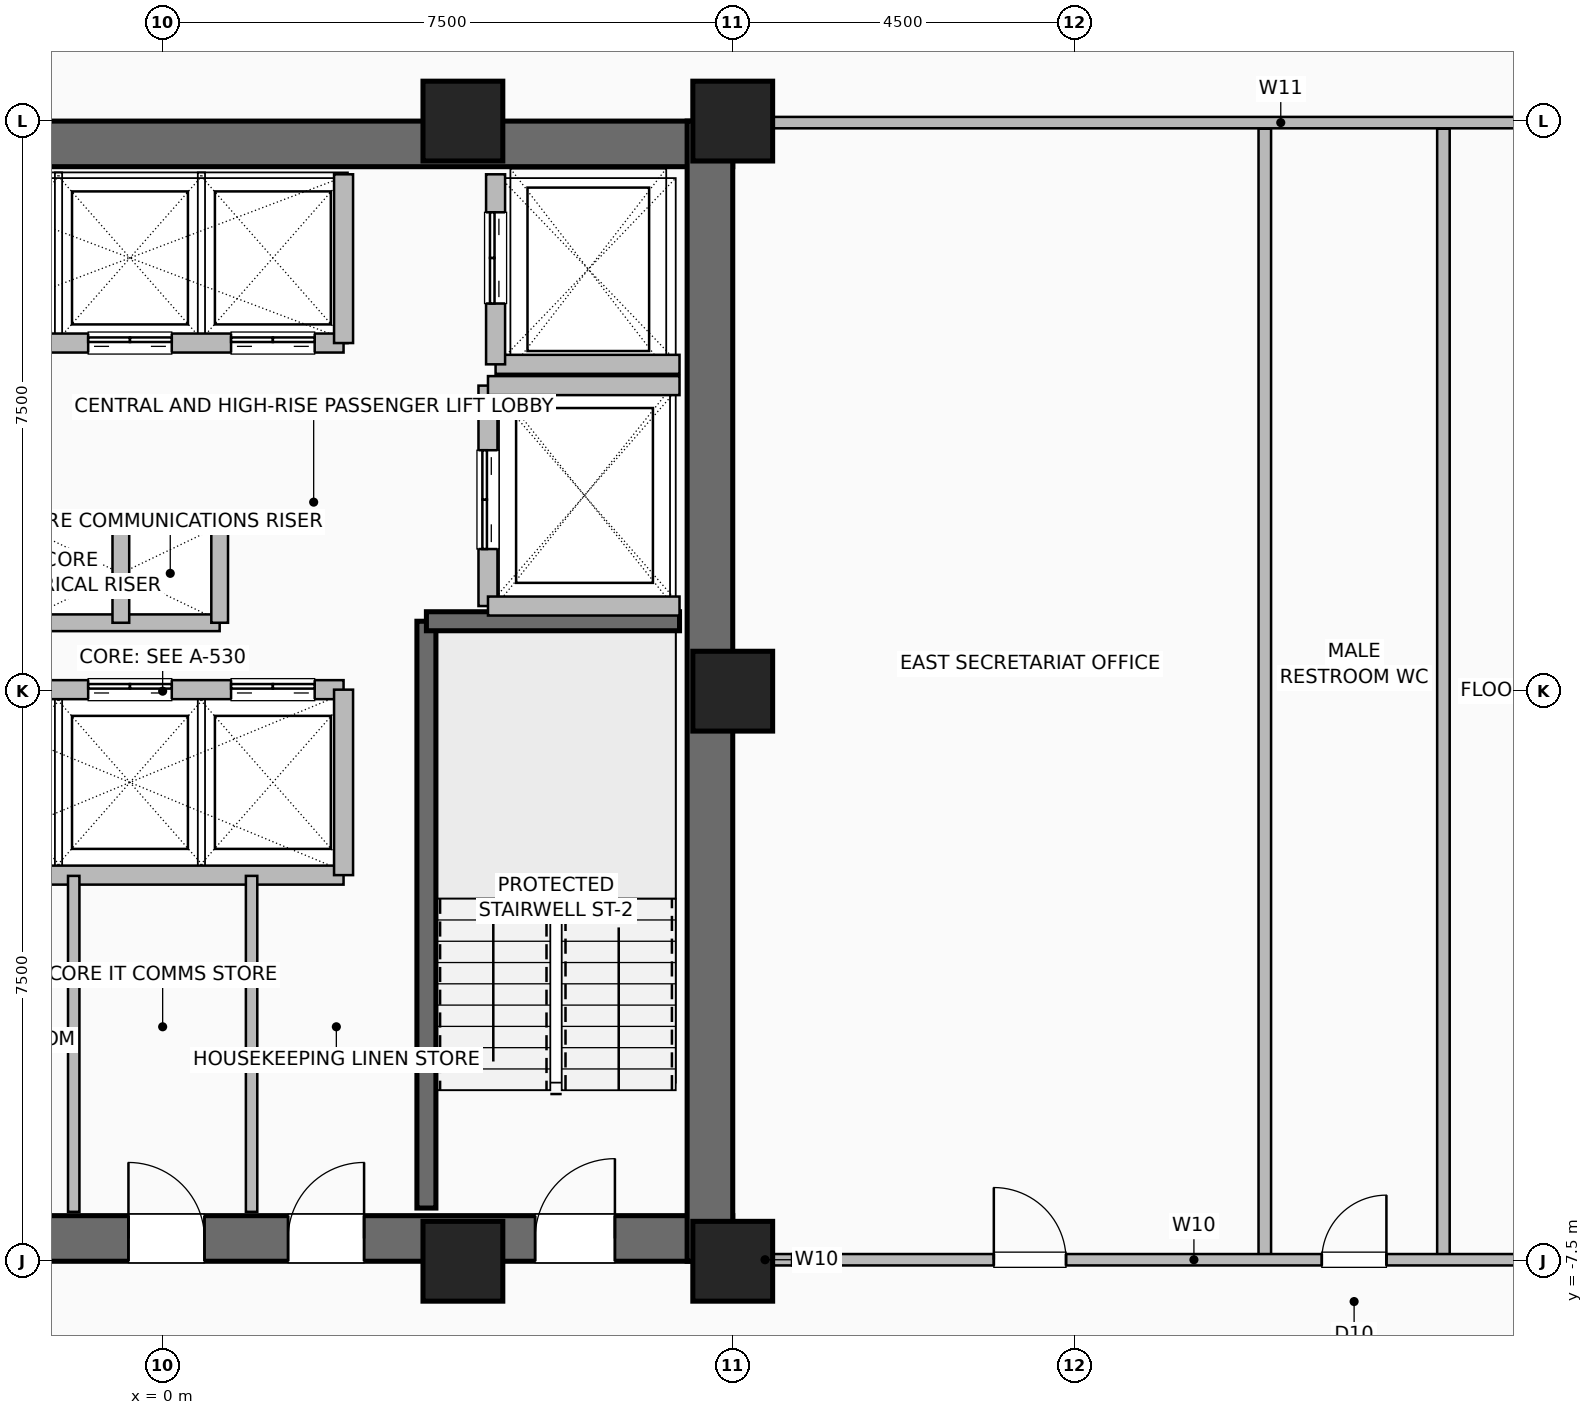
"""IFC4 building model, lengths in metres.
Left out: names, types, materials, properties, quantities, classifications, styles, units other than length and angle.
Written with IfcOpenShell. Run it as: python <this file> out.ifc"""

import sys

from ifc_helpers import new_model, si_unit, direction, frame, frame_2d, origin, origin_2d, place, context, subcontext, project, spatial, rectangle, hollow_rectangle, extrude, element, fill, save


model = new_model("IFC4")
c1 = context("Model", 3, precision=1e-05, world=origin(), true_north=direction((0.0, 1.0)))
c2 = subcontext(c1, "Body", "Model", "MODEL_VIEW")
j1 = project(units=[si_unit("LENGTHUNIT", "METRE"), si_unit("PLANEANGLEUNIT", "RADIAN")], contexts=[c1])
p1 = place(None, origin())
s1 = spatial("IfcSite", under=j1, at=p1, CompositionType="ELEMENT")
p2 = place(p1, origin())
s2 = spatial("IfcBuilding", under=s1, at=p2, CompositionType="ELEMENT")
p3 = place(p2, frame((0.0, 0.0, 115.6)))
s3 = spatial("IfcBuildingStorey", under=s2, at=p3, CompositionType="ELEMENT", Elevation=115.6)
for number, where, z_axis, x_axis in (
    (1, (3.95, -7.5, 0.0), (0.0, 0.0, 1.0), (1.0, 0.0, 0.0)),
    (2, (7.5, -7.5, 0.0), (0.0, 0.0, 1.0), (1.0, 0.0, 0.0)),
    (3, (7.5, 0.0, 0.0), (0.0, 0.0, 1.0), (1.0, 0.0, 0.0)),
    (4, (7.5, 7.5, 0.0), (0.0, 0.0, 1.0), (1.0, 0.0, 0.0)),
    (5, (3.95, 7.5, 0.0), (0.0, 0.0, 1.0), (1.0, 0.0, 0.0)),
):
    element("IfcColumn", number, at=place(p3, frame(where, z_axis=z_axis, x_axis=x_axis)), inside=s3, PredefinedType="COLUMN", context=c2, shape_type="SweptSolid", body=[
        extrude(hollow_rectangle(XDim=1.05, YDim=1.05, WallThickness=0.05, at=origin_2d()), origin(), (0.0, 0.0, 1.0), 3.6),
    ])
p4 = place(p3, frame((-7.5, -7.2, 0.0), z_axis=(0.0, 0.0, 1.0), x_axis=(1.0, 0.0, 0.0)))
e6 = element("IfcWall", 6, at=p4, inside=s3, PredefinedType="SHEAR", context=c2, shape_type="SweptSolid", body=[
    extrude(rectangle(XDim=15.0, YDim=0.6, at=frame_2d((7.5, 0.0))), origin(), (0.0, 0.0, 1.0), 3.36),
])
p5 = place(p4, frame((1.55, 0.0, 0.0)))
e7 = element("IfcOpeningElement", 7, at=p5, cuts=e6, PredefinedType="OPENING", context=c2, shape_type="SweptSolid", body=[
    extrude(rectangle(XDim=1.05, YDim=2.08, at=frame_2d((0.525, 1.04))), frame((0.0, 0.31, 0.0), z_axis=(0.0, -1.0, 0.0), x_axis=(1.0, 0.0, 0.0)), (0.0, 0.0, 1.0), 0.62),
])
p6 = place(p4, frame((12.4, 0.0, 0.0)))
e8 = element("IfcOpeningElement", 8, at=p6, cuts=e6, PredefinedType="OPENING", context=c2, shape_type="SweptSolid", body=[
    extrude(rectangle(XDim=1.05, YDim=2.08, at=frame_2d((0.525, 1.04))), frame((0.0, 0.31, 0.0), z_axis=(0.0, -1.0, 0.0), x_axis=(1.0, 0.0, 0.0)), (0.0, 0.0, 1.0), 0.62),
])
p7 = place(p4, frame((4.95, 0.0, 0.0)))
e9 = element("IfcOpeningElement", 9, at=p7, cuts=e6, PredefinedType="OPENING", context=c2, shape_type="SweptSolid", body=[
    extrude(rectangle(XDim=1.0, YDim=2.08, at=frame_2d((0.5, 1.04))), frame((0.0, 0.31, 0.0), z_axis=(0.0, -1.0, 0.0), x_axis=(1.0, 0.0, 0.0)), (0.0, 0.0, 1.0), 0.62),
])
p8 = place(p4, frame((7.05, 0.0, 0.0)))
e10 = element("IfcOpeningElement", 10, at=p8, cuts=e6, PredefinedType="OPENING", context=c2, shape_type="SweptSolid", body=[
    extrude(rectangle(XDim=1.0, YDim=2.08, at=frame_2d((0.5, 1.04))), frame((0.0, 0.31, 0.0), z_axis=(0.0, -1.0, 0.0), x_axis=(1.0, 0.0, 0.0)), (0.0, 0.0, 1.0), 0.62),
])
p9 = place(p4, frame((9.15, 0.0, 0.0)))
e11 = element("IfcOpeningElement", 11, at=p9, cuts=e6, PredefinedType="OPENING", context=c2, shape_type="SweptSolid", body=[
    extrude(rectangle(XDim=1.0, YDim=2.08, at=frame_2d((0.5, 1.04))), frame((0.0, 0.31, 0.0), z_axis=(0.0, -1.0, 0.0), x_axis=(1.0, 0.0, 0.0)), (0.0, 0.0, 1.0), 0.62),
])
for number, where, z_axis, x_axis in (
    (12, (-7.5, 7.2, 0.0), (0.0, 0.0, 1.0), (1.0, 0.0, 0.0)),
    (13, (7.2, -7.5, 0.0), (0.0, 0.0, 1.0), (0.0, 1.0, 0.0)),
):
    element("IfcWall", number, at=place(p3, frame(where, z_axis=z_axis, x_axis=x_axis)), inside=s3, PredefinedType="SHEAR", context=c2, shape_type="SweptSolid", body=[
        extrude(rectangle(XDim=15.0, YDim=0.6, at=frame_2d((7.5, 0.0))), origin(), (0.0, 0.0, 1.0), 3.36),
    ])
p10 = place(p3, frame((3.47, -6.8, 0.0), z_axis=(0.0, 0.0, 1.0), x_axis=(0.0, 1.0, 0.0)))
e14 = element("IfcWall", 14, at=p10, inside=s3, PredefinedType="SHEAR", context=c2, shape_type="SweptSolid", body=[
    extrude(rectangle(XDim=7.72, YDim=0.25, at=frame_2d((3.86, 0.0))), origin(), (0.0, 0.0, 1.0), 3.36),
])
p11 = place(p3, frame((3.47, 0.92, 0.0), z_axis=(0.0, 0.0, 1.0), x_axis=(1.0, 0.0, 0.0)))
e15 = element("IfcWall", 15, at=p11, inside=s3, PredefinedType="SHEAR", context=c2, shape_type="SweptSolid", body=[
    extrude(rectangle(XDim=3.33, YDim=0.25, at=frame_2d((1.665, 0.0))), origin(), (0.0, 0.0, 1.0), 3.36),
])
for number, where, z_axis, x_axis in (
    (16, (-1.85, 2.2, 0.0), (0.0, 0.0, 1.0), (1.0, 0.0, 0.0)),
    (17, (-1.85, 0.9, 0.0), (0.0, 0.0, 1.0), (1.0, 0.0, 0.0)),
):
    element("IfcWall", number, at=place(p3, frame(where, z_axis=z_axis, x_axis=x_axis)), inside=s3, PredefinedType="PARTITIONING", context=c2, shape_type="SweptSolid", body=[
        extrude(rectangle(XDim=2.6, YDim=0.22, at=frame_2d((1.3, 0.0))), origin(), (0.0, 0.0, 1.0), 3.36),
    ])
for number, where, z_axis, x_axis in (
    (18, (-0.55, 0.9, 0.0), (0.0, 0.0, 1.0), (0.0, 1.0, 0.0)),
    (19, (0.75, 0.9, 0.0), (0.0, 0.0, 1.0), (0.0, 1.0, 0.0)),
):
    element("IfcWall", number, at=place(p3, frame(where, z_axis=z_axis, x_axis=x_axis)), inside=s3, PredefinedType="PARTITIONING", context=c2, shape_type="SweptSolid", body=[
        extrude(rectangle(XDim=1.3, YDim=0.22, at=frame_2d((0.65, 0.0))), origin(), (0.0, 0.0, 1.0), 3.36),
    ])
p12 = place(p3, frame((-3.26, 0.02, 0.0), z_axis=(0.0, 0.0, 1.0), x_axis=(1.0, 0.0, 0.0)))
e20 = element("IfcWall", 20, at=p12, inside=s3, PredefinedType="SHEAR", context=c2, shape_type="SweptSolid", body=[
    extrude(rectangle(XDim=5.64, YDim=0.25, at=frame_2d((2.82, 0.0))), origin(), (0.0, 0.0, 1.0), 3.36),
])
p13 = place(p12, frame((0.4, 0.0, 0.0)))
e21 = element("IfcOpeningElement", 21, at=p13, cuts=e20, PredefinedType="OPENING", context=c2, shape_type="SweptSolid", body=[
    extrude(rectangle(XDim=1.1, YDim=2.2, at=frame_2d((0.55, 1.1))), frame((0.0, 0.135, 0.0), z_axis=(0.0, -1.0, 0.0), x_axis=(1.0, 0.0, 0.0)), (0.0, 0.0, 1.0), 0.27),
])
p14 = place(p12, frame((2.28, 0.0, 0.0)))
e22 = element("IfcOpeningElement", 22, at=p14, cuts=e20, PredefinedType="OPENING", context=c2, shape_type="SweptSolid", body=[
    extrude(rectangle(XDim=1.1, YDim=2.2, at=frame_2d((0.55, 1.1))), frame((0.0, 0.135, 0.0), z_axis=(0.0, -1.0, 0.0), x_axis=(1.0, 0.0, 0.0)), (0.0, 0.0, 1.0), 0.27),
])
p15 = place(p12, frame((4.16, 0.0, 0.0)))
e23 = element("IfcOpeningElement", 23, at=p15, cuts=e20, PredefinedType="OPENING", context=c2, shape_type="SweptSolid", body=[
    extrude(rectangle(XDim=1.1, YDim=2.2, at=frame_2d((0.55, 1.1))), frame((0.0, 0.135, 0.0), z_axis=(0.0, -1.0, 0.0), x_axis=(1.0, 0.0, 0.0)), (0.0, 0.0, 1.0), 0.27),
])
p16 = place(p3, frame((-3.26, -2.42, 0.0), z_axis=(0.0, 0.0, 1.0), x_axis=(1.0, 0.0, 0.0)))
e24 = element("IfcWall", 24, at=p16, inside=s3, PredefinedType="SHEAR", context=c2, shape_type="SweptSolid", body=[
    extrude(rectangle(XDim=5.64, YDim=0.25, at=frame_2d((2.82, 0.0))), origin(), (0.0, 0.0, 1.0), 3.36),
])
p17 = place(p3, frame((2.38, -2.42, 0.0), z_axis=(0.0, 0.0, 1.0), x_axis=(0.0, 1.0, 0.0)))
e25 = element("IfcWall", 25, at=p17, inside=s3, PredefinedType="SHEAR", context=c2, shape_type="SweptSolid", body=[
    extrude(rectangle(XDim=2.44, YDim=0.25, at=frame_2d((1.22, 0.0))), origin(), (0.0, 0.0, 1.0), 3.36),
])
p18 = place(p3, frame((-3.26, 4.58, 0.0), z_axis=(0.0, 0.0, 1.0), x_axis=(1.0, 0.0, 0.0)))
e26 = element("IfcWall", 26, at=p18, inside=s3, PredefinedType="SHEAR", context=c2, shape_type="SweptSolid", body=[
    extrude(rectangle(XDim=5.64, YDim=0.25, at=frame_2d((2.82, 0.0))), origin(), (0.0, 0.0, 1.0), 3.36),
])
p19 = place(p18, frame((0.4, 0.0, 0.0)))
e27 = element("IfcOpeningElement", 27, at=p19, cuts=e26, PredefinedType="OPENING", context=c2, shape_type="SweptSolid", body=[
    extrude(rectangle(XDim=1.1, YDim=2.2, at=frame_2d((0.55, 1.1))), frame((0.0, 0.135, 0.0), z_axis=(0.0, -1.0, 0.0), x_axis=(1.0, 0.0, 0.0)), (0.0, 0.0, 1.0), 0.27),
])
p20 = place(p18, frame((2.28, 0.0, 0.0)))
e28 = element("IfcOpeningElement", 28, at=p20, cuts=e26, PredefinedType="OPENING", context=c2, shape_type="SweptSolid", body=[
    extrude(rectangle(XDim=1.1, YDim=2.2, at=frame_2d((0.55, 1.1))), frame((0.0, 0.135, 0.0), z_axis=(0.0, -1.0, 0.0), x_axis=(1.0, 0.0, 0.0)), (0.0, 0.0, 1.0), 0.27),
])
p21 = place(p18, frame((4.16, 0.0, 0.0)))
e29 = element("IfcOpeningElement", 29, at=p21, cuts=e26, PredefinedType="OPENING", context=c2, shape_type="SweptSolid", body=[
    extrude(rectangle(XDim=1.1, YDim=2.2, at=frame_2d((0.55, 1.1))), frame((0.0, 0.135, 0.0), z_axis=(0.0, -1.0, 0.0), x_axis=(1.0, 0.0, 0.0)), (0.0, 0.0, 1.0), 0.27),
])
p22 = place(p3, frame((2.38, 4.58, 0.0), z_axis=(0.0, 0.0, 1.0), x_axis=(0.0, 1.0, 0.0)))
e30 = element("IfcWall", 30, at=p22, inside=s3, PredefinedType="SHEAR", context=c2, shape_type="SweptSolid", body=[
    extrude(rectangle(XDim=2.22, YDim=0.25, at=frame_2d((1.11, 0.0))), origin(), (0.0, 0.0, 1.0), 3.36),
])
p23 = place(p3, frame((4.38, 4.3, 0.0), z_axis=(0.0, 0.0, 1.0), x_axis=(1.0, 0.0, 0.0)))
e31 = element("IfcWall", 31, at=p23, inside=s3, PredefinedType="SHEAR", context=c2, shape_type="SweptSolid", body=[
    extrude(rectangle(XDim=2.42, YDim=0.25, at=frame_2d((1.21, 0.0))), origin(), (0.0, 0.0, 1.0), 3.36),
])
p24 = place(p3, frame((4.38, 4.3, 0.0), z_axis=(0.0, 0.0, 1.0), x_axis=(0.0, 1.0, 0.0)))
e32 = element("IfcWall", 32, at=p24, inside=s3, PredefinedType="SHEAR", context=c2, shape_type="SweptSolid", body=[
    extrude(rectangle(XDim=2.5, YDim=0.25, at=frame_2d((1.25, 0.0))), origin(), (0.0, 0.0, 1.0), 3.36),
])
p25 = place(p24, frame((0.8, 0.0, 0.0)))
e33 = element("IfcOpeningElement", 33, at=p25, cuts=e32, PredefinedType="OPENING", context=c2, shape_type="SweptSolid", body=[
    extrude(rectangle(XDim=1.2, YDim=2.2, at=frame_2d((0.6, 1.1))), frame((0.0, 0.135, 0.0), z_axis=(0.0, -1.0, 0.0), x_axis=(1.0, 0.0, 0.0)), (0.0, 0.0, 1.0), 0.27),
])
p26 = place(p3, frame((4.28, 1.12, 0.0), z_axis=(0.0, 0.0, 1.0), x_axis=(0.0, 1.0, 0.0)))
e34 = element("IfcWall", 34, at=p26, inside=s3, PredefinedType="SHEAR", context=c2, shape_type="SweptSolid", body=[
    extrude(rectangle(XDim=2.9, YDim=0.25, at=frame_2d((1.45, 0.0))), origin(), (0.0, 0.0, 1.0), 3.36),
])
p27 = place(p26, frame((0.75, 0.0, 0.0)))
e35 = element("IfcOpeningElement", 35, at=p27, cuts=e34, PredefinedType="OPENING", context=c2, shape_type="SweptSolid", body=[
    extrude(rectangle(XDim=1.3, YDim=2.3, at=frame_2d((0.65, 1.15))), frame((0.0, 0.135, 0.0), z_axis=(0.0, -1.0, 0.0), x_axis=(1.0, 0.0, 0.0)), (0.0, 0.0, 1.0), 0.27),
])
for number, where, z_axis, x_axis in (
    (36, (4.28, 1.12, 0.0), (0.0, 0.0, 1.0), (1.0, 0.0, 0.0)),
    (37, (4.28, 4.02, 0.0), (0.0, 0.0, 1.0), (1.0, 0.0, 0.0)),
):
    element("IfcWall", number, at=place(p3, frame(where, z_axis=z_axis, x_axis=x_axis)), inside=s3, PredefinedType="SHEAR", context=c2, shape_type="SweptSolid", body=[
        extrude(rectangle(XDim=2.52, YDim=0.25, at=frame_2d((1.26, 0.0))), origin(), (0.0, 0.0, 1.0), 3.36),
    ])
for number, where, z_axis, x_axis in (
    (38, (-1.17, -6.85, 0.0), (0.0, 0.0, 1.0), (0.0, 1.0, 0.0)),
    (39, (1.17, -6.85, 0.0), (0.0, 0.0, 1.0), (0.0, 1.0, 0.0)),
):
    element("IfcWall", number, at=place(p3, frame(where, z_axis=z_axis, x_axis=x_axis)), inside=s3, PredefinedType="PARTITIONING", context=c2, shape_type="SweptSolid", body=[
        extrude(rectangle(XDim=4.42, YDim=0.15, at=frame_2d((2.21, 0.0))), origin(), (0.0, 0.0, 1.0), 3.36),
    ])
p28 = place(p3, frame((7.45, -7.48, 0.0), z_axis=(0.0, 0.0, 1.0), x_axis=(1.0, 0.0, 0.0)))
e40 = element("IfcWall", 40, at=p28, inside=s3, PredefinedType="PARTITIONING", context=c2, shape_type="SweptSolid", body=[
    extrude(rectangle(XDim=0.95, YDim=0.15, at=frame_2d((0.475, 0.0))), origin(), (0.0, 0.0, 1.0), 3.36),
])
for number, where, z_axis, x_axis in (
    (41, (16.85, -7.48, 0.0), (0.0, 0.0, 1.0), (0.0, 1.0, 0.0)),
    (42, (14.5, -7.48, 0.0), (0.0, 0.0, 1.0), (0.0, 1.0, 0.0)),
):
    element("IfcWall", number, at=place(p3, frame(where, z_axis=z_axis, x_axis=x_axis)), inside=s3, PredefinedType="PLUMBINGWALL", context=c2, shape_type="SweptSolid", body=[
        extrude(rectangle(XDim=14.88, YDim=0.165, at=frame_2d((7.44, 0.0))), origin(), (0.0, 0.0, 1.0), 3.36),
    ])
p29 = place(p3, frame((8.28, -7.48, 0.0), z_axis=(0.0, 0.0, 1.0), x_axis=(1.0, 0.0, 0.0)))
e43 = element("IfcWall", 43, at=p29, inside=s3, PredefinedType="PARTITIONING", context=c2, shape_type="SweptSolid", body=[
    extrude(rectangle(XDim=13.54, YDim=0.15, at=frame_2d((6.77, 0.0))), origin(), (0.0, 0.0, 1.0), 3.36),
])
p30 = place(p29, frame((2.655, 0.0, 0.0)))
e44 = element("IfcOpeningElement", 44, at=p30, cuts=e43, PredefinedType="OPENING", context=c2, shape_type="SweptSolid", body=[
    extrude(rectangle(XDim=0.95, YDim=2.06, at=frame_2d((0.475, 1.03))), frame((0.0, 0.085, 0.0), z_axis=(0.0, -1.0, 0.0), x_axis=(1.0, 0.0, 0.0)), (0.0, 0.0, 1.0), 0.17),
])
p31 = place(p29, frame((6.97, 0.0, 0.0)))
e45 = element("IfcOpeningElement", 45, at=p31, cuts=e43, PredefinedType="OPENING", context=c2, shape_type="SweptSolid", body=[
    extrude(rectangle(XDim=0.85, YDim=2.05, at=frame_2d((0.425, 1.025))), frame((0.0, 0.085, 0.0), z_axis=(0.0, -1.0, 0.0), x_axis=(1.0, 0.0, 0.0)), (0.0, 0.0, 1.0), 0.17),
])
p32 = place(p29, frame((10.52, 0.0, 0.0)))
e46 = element("IfcOpeningElement", 46, at=p32, cuts=e43, PredefinedType="OPENING", context=c2, shape_type="SweptSolid", body=[
    extrude(rectangle(XDim=0.95, YDim=2.06, at=frame_2d((0.475, 1.03))), frame((0.0, 0.085, 0.0), z_axis=(0.0, -1.0, 0.0), x_axis=(1.0, 0.0, 0.0)), (0.0, 0.0, 1.0), 0.17),
])
p33 = place(p3, frame((7.6, 7.48, 0.0), z_axis=(0.0, 0.0, 1.0), x_axis=(1.0, 0.0, 0.0)))
e47 = element("IfcWall", 47, at=p33, inside=s3, PredefinedType="PARTITIONING", context=c2, shape_type="SweptSolid", body=[
    extrude(rectangle(XDim=14.22, YDim=0.15, at=frame_2d((7.11, 0.0))), origin(), (0.0, 0.0, 1.0), 3.36),
])
p34 = place(p6, origin())
e48 = element("IfcDoor", 48, at=p34, inside=s3, OperationType="SINGLE_SWING_RIGHT", PredefinedType="DOOR", context=c2, shape_type="SweptSolid", body=[
    extrude(rectangle(XDim=1.05, YDim=2.08, at=frame_2d((0.525, 1.04))), frame((0.0, 0.025, 0.0), z_axis=(0.0, -1.0, 0.0), x_axis=(1.0, 0.0, 0.0)), (0.0, 0.0, 1.0), 0.05),
])
fill(e8, e48)
p35 = place(p8, origin())
e49 = element("IfcDoor", 49, at=p35, inside=s3, OperationType="SINGLE_SWING_LEFT", PredefinedType="DOOR", context=c2, shape_type="SweptSolid", body=[
    extrude(rectangle(XDim=1.0, YDim=2.08, at=frame_2d((0.5, 1.04))), frame((0.0, 0.025, 0.0), z_axis=(0.0, -1.0, 0.0), x_axis=(1.0, 0.0, 0.0)), (0.0, 0.0, 1.0), 0.05),
])
fill(e10, e49)
p36 = place(p9, origin())
e50 = element("IfcDoor", 50, at=p36, inside=s3, OperationType="SINGLE_SWING_RIGHT", PredefinedType="DOOR", context=c2, shape_type="SweptSolid", body=[
    extrude(rectangle(XDim=1.0, YDim=2.08, at=frame_2d((0.5, 1.04))), frame((0.0, 0.025, 0.0), z_axis=(0.0, -1.0, 0.0), x_axis=(1.0, 0.0, 0.0)), (0.0, 0.0, 1.0), 0.05),
])
fill(e11, e50)
p37 = place(p14, origin())
e51 = element("IfcDoor", 51, at=p37, inside=s3, OperationType="DOUBLE_DOOR_SLIDING", PredefinedType="DOOR", context=c2, shape_type="SweptSolid", body=[
    extrude(rectangle(XDim=1.1, YDim=2.2, at=frame_2d((0.55, 1.1))), frame((0.0, 0.025, 0.0), z_axis=(0.0, -1.0, 0.0), x_axis=(1.0, 0.0, 0.0)), (0.0, 0.0, 1.0), 0.05),
])
fill(e22, e51)
p38 = place(p15, origin())
e52 = element("IfcDoor", 52, at=p38, inside=s3, OperationType="DOUBLE_DOOR_SLIDING", PredefinedType="DOOR", context=c2, shape_type="SweptSolid", body=[
    extrude(rectangle(XDim=1.1, YDim=2.2, at=frame_2d((0.55, 1.1))), frame((0.0, 0.025, 0.0), z_axis=(0.0, -1.0, 0.0), x_axis=(1.0, 0.0, 0.0)), (0.0, 0.0, 1.0), 0.05),
])
fill(e23, e52)
p39 = place(p20, origin())
e53 = element("IfcDoor", 53, at=p39, inside=s3, OperationType="DOUBLE_DOOR_SLIDING", PredefinedType="DOOR", context=c2, shape_type="SweptSolid", body=[
    extrude(rectangle(XDim=1.1, YDim=2.2, at=frame_2d((0.55, 1.1))), frame((0.0, 0.025, 0.0), z_axis=(0.0, -1.0, 0.0), x_axis=(1.0, 0.0, 0.0)), (0.0, 0.0, 1.0), 0.05),
])
fill(e28, e53)
p40 = place(p21, origin())
e54 = element("IfcDoor", 54, at=p40, inside=s3, OperationType="DOUBLE_DOOR_SLIDING", PredefinedType="DOOR", context=c2, shape_type="SweptSolid", body=[
    extrude(rectangle(XDim=1.1, YDim=2.2, at=frame_2d((0.55, 1.1))), frame((0.0, 0.025, 0.0), z_axis=(0.0, -1.0, 0.0), x_axis=(1.0, 0.0, 0.0)), (0.0, 0.0, 1.0), 0.05),
])
fill(e29, e54)
p41 = place(p25, origin())
e55 = element("IfcDoor", 55, at=p41, inside=s3, OperationType="DOUBLE_DOOR_SLIDING", PredefinedType="DOOR", context=c2, shape_type="SweptSolid", body=[
    extrude(rectangle(XDim=1.2, YDim=2.2, at=frame_2d((0.6, 1.1))), frame((0.0, 0.025, 0.0), z_axis=(0.0, -1.0, 0.0), x_axis=(1.0, 0.0, 0.0)), (0.0, 0.0, 1.0), 0.05),
])
fill(e33, e55)
p42 = place(p27, origin())
e56 = element("IfcDoor", 56, at=p42, inside=s3, OperationType="DOUBLE_DOOR_SLIDING", PredefinedType="DOOR", context=c2, shape_type="SweptSolid", body=[
    extrude(rectangle(XDim=1.3, YDim=2.3, at=frame_2d((0.65, 1.15))), frame((0.0, 0.025, 0.0), z_axis=(0.0, -1.0, 0.0), x_axis=(1.0, 0.0, 0.0)), (0.0, 0.0, 1.0), 0.05),
])
fill(e35, e56)
p43 = place(p30, origin())
e57 = element("IfcDoor", 57, at=p43, inside=s3, OperationType="SINGLE_SWING_LEFT", PredefinedType="DOOR", context=c2, shape_type="SweptSolid", body=[
    extrude(rectangle(XDim=0.95, YDim=2.06, at=frame_2d((0.475, 1.03))), frame((0.0, 0.025, 0.0), z_axis=(0.0, -1.0, 0.0), x_axis=(1.0, 0.0, 0.0)), (0.0, 0.0, 1.0), 0.05),
])
fill(e44, e57)
p44 = place(p31, origin())
e58 = element("IfcDoor", 58, at=p44, inside=s3, OperationType="SINGLE_SWING_RIGHT", PredefinedType="DOOR", context=c2, shape_type="SweptSolid", body=[
    extrude(rectangle(XDim=0.85, YDim=2.05, at=frame_2d((0.425, 1.025))), frame((0.0, 0.025, 0.0), z_axis=(0.0, -1.0, 0.0), x_axis=(1.0, 0.0, 0.0)), (0.0, 0.0, 1.0), 0.05),
])
fill(e45, e58)
save(model, sys.argv[1])
